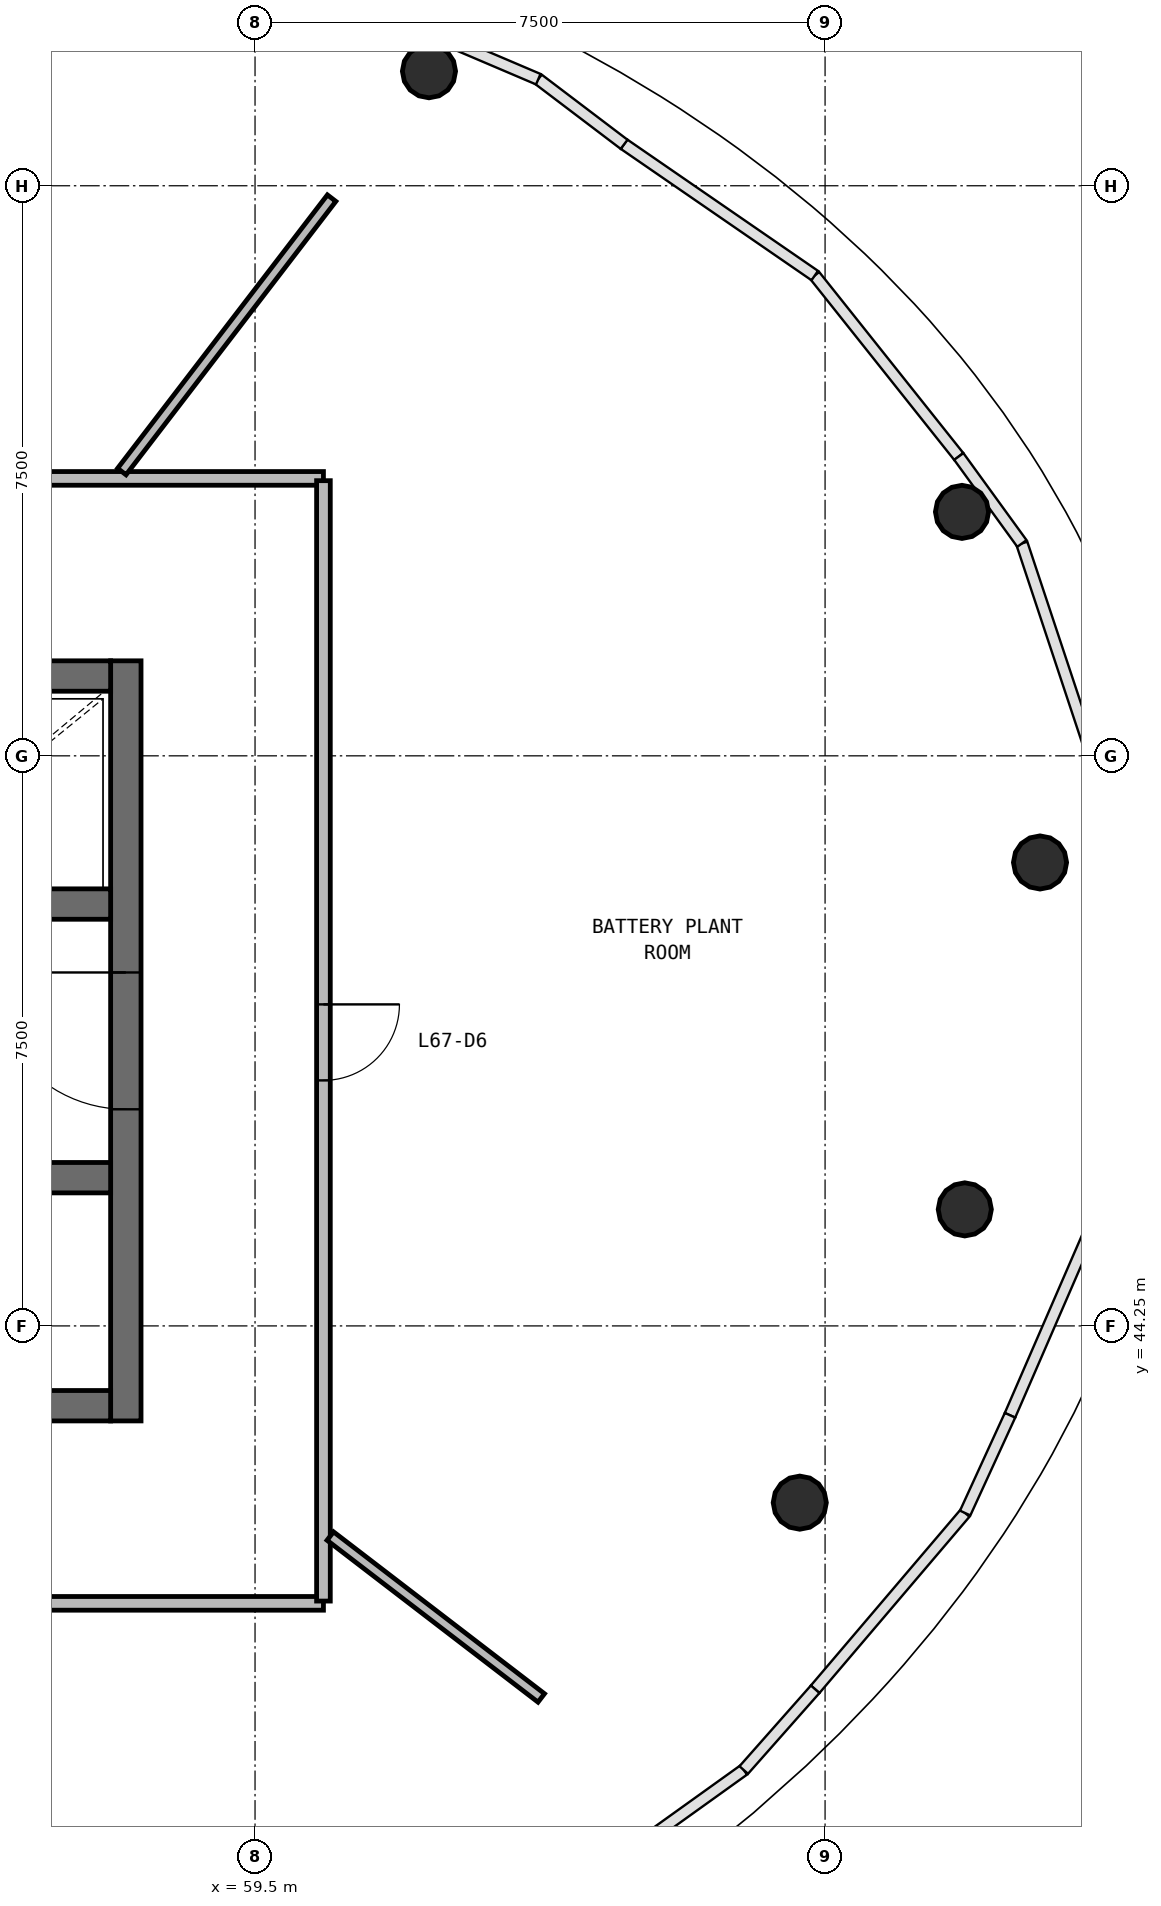
"""IFC4 building model, lengths in metres.
Left out: names, types, materials, properties, quantities, classifications, styles, units other than length and angle.
Written with IfcOpenShell. Run it as: python <this file> out.ifc"""

import sys

from ifc_helpers import new_model, si_unit, direction, frame, frame_2d, origin, origin_2d, place, context, subcontext, project, spatial, rectangle, circle, extrude, source, transform, mapped, element, fill, save


model = new_model("IFC4")
c1 = context("Model", 3, precision=1e-05, world=origin(), true_north=direction((0.0, 1.0)))
c2 = subcontext(c1, "Body", "Model", "MODEL_VIEW")
j1 = project(units=[si_unit("LENGTHUNIT", "METRE"), si_unit("PLANEANGLEUNIT", "RADIAN")], contexts=[c1])
p1 = place(None, origin())
s1 = spatial("IfcSite", under=j1, at=p1, CompositionType="ELEMENT")
p2 = place(p1, origin())
s2 = spatial("IfcBuilding", under=s1, at=p2, CompositionType="ELEMENT")
p3 = place(p2, frame((0.0, 0.0, 273.1)))
s3 = spatial("IfcBuildingStorey", under=s2, at=p3, CompositionType="ELEMENT", Elevation=273.1)
p4 = place(p3, frame((57.8, 43.0, 0.0), z_axis=(0.0, 0.0, 1.0), x_axis=(0.0, 1.0, 0.0)))
e1 = element("IfcWall", 1, at=p4, inside=s3, PredefinedType="SHEAR", context=c2, shape_type="SweptSolid", body=[
    extrude(rectangle(XDim=10.0, YDim=0.4, at=frame_2d((5.0, 0.0))), origin(), (0.0, 0.0, 1.0), 3.5),
])
p5 = place(p4, frame((4.1, 0.0, 0.0)))
e2 = element("IfcOpeningElement", 2, at=p5, cuts=e1, PredefinedType="OPENING", context=c2, shape_type="SweptSolid", body=[
    extrude(rectangle(XDim=1.8, YDim=2.1, at=frame_2d((0.9, 1.05))), frame((0.0, 0.21, 0.0), z_axis=(0.0, -1.0, 0.0), x_axis=(1.0, 0.0, 0.0)), (0.0, 0.0, 1.0), 0.42),
])
p6 = place(p3, frame((46.4, 43.2, 0.0), z_axis=(0.0, 0.0, 1.0), x_axis=(1.0, 0.0, 0.0)))
e3 = element("IfcWall", 3, at=p6, inside=s3, PredefinedType="SHEAR", context=c2, shape_type="SweptSolid", body=[
    extrude(rectangle(XDim=11.2, YDim=0.4, at=frame_2d((5.6, 0.0))), origin(), (0.0, 0.0, 1.0), 3.5),
])
p7 = place(p3, frame((57.6, 52.8, 0.0), z_axis=(0.0, 0.0, 1.0), x_axis=(-1.0, 0.0, 0.0)))
e4 = element("IfcWall", 4, at=p7, inside=s3, PredefinedType="SHEAR", context=c2, shape_type="SweptSolid", body=[
    extrude(rectangle(XDim=11.2, YDim=0.4, at=frame_2d((5.6, 0.0))), origin(), (0.0, 0.0, 1.0), 3.5),
])
p8 = place(p7, frame((6.1, 0.0, 0.0)))
e5 = element("IfcOpeningElement", 5, at=p8, cuts=e4, PredefinedType="OPENING", context=c2, shape_type="SweptSolid", body=[
    extrude(rectangle(XDim=1.0, YDim=2.1, at=frame_2d((0.5, 1.05))), frame((0.0, 0.21, 0.0), z_axis=(0.0, -1.0, 0.0), x_axis=(1.0, 0.0, 0.0)), (0.0, 0.0, 1.0), 0.42),
])
p9 = place(p3, frame((46.4, 49.8, 0.0), z_axis=(0.0, 0.0, 1.0), x_axis=(1.0, 0.0, 0.0)))
e6 = element("IfcWall", 6, at=p9, inside=s3, PredefinedType="SHEAR", context=c2, shape_type="SweptSolid", body=[
    extrude(rectangle(XDim=11.2, YDim=0.4, at=frame_2d((5.6, 0.0))), origin(), (0.0, 0.0, 1.0), 3.5),
])
p10 = place(p9, frame((8.95, 0.0, 0.0)))
e7 = element("IfcOpeningElement", 7, at=p10, cuts=e6, PredefinedType="OPENING", context=c2, shape_type="SweptSolid", body=[
    extrude(rectangle(XDim=1.1, YDim=2.1, at=frame_2d((0.55, 1.05))), frame((0.0, 0.21, 0.0), z_axis=(0.0, -1.0, 0.0), x_axis=(1.0, 0.0, 0.0)), (0.0, 0.0, 1.0), 0.42),
])
p11 = place(p9, frame((5.65, 0.0, 0.0)))
e8 = element("IfcOpeningElement", 8, at=p11, cuts=e6, PredefinedType="OPENING", context=c2, shape_type="SweptSolid", body=[
    extrude(rectangle(XDim=0.9, YDim=2.1, at=frame_2d((0.45, 1.05))), frame((0.0, 0.21, 0.0), z_axis=(0.0, -1.0, 0.0), x_axis=(1.0, 0.0, 0.0)), (0.0, 0.0, 1.0), 0.42),
])
p12 = place(p3, frame((46.4, 46.2, 0.0), z_axis=(0.0, 0.0, 1.0), x_axis=(1.0, 0.0, 0.0)))
e9 = element("IfcWall", 9, at=p12, inside=s3, PredefinedType="SHEAR", context=c2, shape_type="SweptSolid", body=[
    extrude(rectangle(XDim=11.2, YDim=0.4, at=frame_2d((5.6, 0.0))), origin(), (0.0, 0.0, 1.0), 3.5),
])
p13 = place(p12, frame((5.65, 0.0, 0.0)))
e10 = element("IfcOpeningElement", 10, at=p13, cuts=e9, PredefinedType="OPENING", context=c2, shape_type="SweptSolid", body=[
    extrude(rectangle(XDim=0.9, YDim=2.1, at=frame_2d((0.45, 1.05))), frame((0.0, 0.21, 0.0), z_axis=(0.0, -1.0, 0.0), x_axis=(1.0, 0.0, 0.0)), (0.0, 0.0, 1.0), 0.42),
])
m1 = source(origin(), c2, "Body", "SweptSolid", [
    extrude(circle(Radius=0.35, at=origin_2d()), origin(), (0.0, 0.0, 1.0), 4.014),
])
p14 = place(p3, frame((69.828, 50.347, 0.174), z_axis=(-0.485558404991, -0.063918071599, 0.871864390525), x_axis=(0.130512333023, -0.991446685873, 0.0)))
e11 = element("IfcColumn", 11, at=p14, inside=s3, PredefinedType="COLUMN", context=c2, shape_type="MappedRepresentation", body=[
    mapped(m1, transform((0.0, 0.0, 0.0), scale=1.0)),
])
m2 = source(origin(), c2, "Body", "SweptSolid", [
    extrude(circle(Radius=0.35, at=origin_2d()), origin(), (0.0, 0.0, 1.0), 4.07),
])
p15 = place(p3, frame((68.802, 54.959, 0.181), z_axis=(-0.471360109961, -0.195275188739, 0.860050723737), x_axis=(0.38273602667, -0.923857745483, 0.0)))
e12 = element("IfcColumn", 12, at=p15, inside=s3, PredefinedType="COLUMN", context=c2, shape_type="MappedRepresentation", body=[
    mapped(m2, transform((0.0, 0.0, 0.0), scale=1.0)),
])
m3 = source(origin(), c2, "Body", "SweptSolid", [
    extrude(circle(Radius=0.35, at=origin_2d()), origin(), (0.0, 0.0, 1.0), 3.908),
])
p16 = place(p3, frame((61.789, 60.757, 0.159), z_axis=(-0.270818872405, -0.352907914698, 0.895607694302), x_axis=(0.793328254579, -0.608794119951, 0.0)))
e13 = element("IfcColumn", 13, at=p16, inside=s3, PredefinedType="COLUMN", context=c2, shape_type="MappedRepresentation", body=[
    mapped(m3, transform((0.0, 0.0, 0.0), scale=1.0)),
])
m4 = source(origin(), c2, "Body", "SweptSolid", [
    extrude(circle(Radius=0.35, at=origin_2d()), origin(), (0.0, 0.0, 1.0), 3.834),
])
p17 = place(p3, frame((57.773, 61.938, 0.146), z_axis=(-0.156149965991, -0.377001549212, 0.912955102956), x_axis=(0.923887493655, -0.382664211899, 0.0)))
e14 = element("IfcColumn", 14, at=p17, inside=s3, PredefinedType="COLUMN", context=c2, shape_type="MappedRepresentation", body=[
    mapped(m4, transform((0.0, 0.0, 0.0), scale=1.0)),
])
m5 = source(origin(), c2, "Body", "SweptSolid", [
    extrude(circle(Radius=0.35, at=origin_2d()), origin(), (0.0, 0.0, 1.0), 3.739),
])
p18 = place(p3, frame((60.756, 36.59, 0.126), z_axis=(-0.213999096527, 0.278845328706, 0.936188906869), x_axis=(-0.79330723931, -0.608821504267, 0.0)))
e15 = element("IfcColumn", 15, at=p18, inside=s3, PredefinedType="COLUMN", context=c2, shape_type="MappedRepresentation", body=[
    mapped(m5, transform((0.0, 0.0, 0.0), scale=1.0)),
])
m6 = source(origin(), c2, "Body", "SweptSolid", [
    extrude(circle(Radius=0.35, at=origin_2d()), origin(), (0.0, 0.0, 1.0), 3.807),
])
p19 = place(p3, frame((66.667, 41.925, 0.141), z_axis=(-0.363645996148, 0.150626775693, 0.919278610613), x_axis=(-0.382682721486, -0.923879826967, 0.0)))
e16 = element("IfcColumn", 16, at=p19, inside=s3, PredefinedType="COLUMN", context=c2, shape_type="MappedRepresentation", body=[
    mapped(m6, transform((0.0, 0.0, 0.0), scale=1.0)),
])
m7 = source(origin(), c2, "Body", "SweptSolid", [
    extrude(circle(Radius=0.35, at=origin_2d()), origin(), (0.0, 0.0, 1.0), 3.898),
])
p20 = place(p3, frame((68.838, 45.783, 0.157), z_axis=(-0.436525820631, 0.057493644669, 0.897852821316), x_axis=(-0.130579616175, -0.991437826512, 0.0)))
e17 = element("IfcColumn", 17, at=p20, inside=s3, PredefinedType="COLUMN", context=c2, shape_type="MappedRepresentation", body=[
    mapped(m7, transform((0.0, 0.0, 0.0), scale=1.0)),
])
p21 = place(p3, frame((43.6, 55.4, 0.0), z_axis=(0.0, 0.0, 1.0), x_axis=(1.0, 0.0, 0.0)))
e18 = element("IfcWall", 18, at=p21, inside=s3, PredefinedType="PARTITIONING", context=c2, shape_type="SweptSolid", body=[
    extrude(rectangle(XDim=16.8, YDim=0.18, at=frame_2d((8.4, 0.0))), origin(), (0.0, 0.0, 1.0), 2.62),
])
p22 = place(p21, frame((7.95, 0.0, 0.0)))
e19 = element("IfcOpeningElement", 19, at=p22, cuts=e18, PredefinedType="OPENING", context=c2, shape_type="SweptSolid", body=[
    extrude(rectangle(XDim=1.0, YDim=2.1, at=frame_2d((0.5, 1.05))), frame((0.0, 0.1, 0.0), z_axis=(0.0, -1.0, 0.0), x_axis=(1.0, 0.0, 0.0)), (0.0, 0.0, 1.0), 0.2),
])
p23 = place(p3, frame((60.4, 40.6, 0.0), z_axis=(0.0, 0.0, 1.0), x_axis=(-1.0, 0.0, 0.0)))
e20 = element("IfcWall", 20, at=p23, inside=s3, PredefinedType="PARTITIONING", context=c2, shape_type="SweptSolid", body=[
    extrude(rectangle(XDim=16.8, YDim=0.18, at=frame_2d((8.4, 0.0))), origin(), (0.0, 0.0, 1.0), 2.62),
])
p24 = place(p23, frame((7.95, 0.0, 0.0)))
e21 = element("IfcOpeningElement", 21, at=p24, cuts=e20, PredefinedType="OPENING", context=c2, shape_type="SweptSolid", body=[
    extrude(rectangle(XDim=1.0, YDim=2.1, at=frame_2d((0.5, 1.05))), frame((0.0, 0.1, 0.0), z_axis=(0.0, -1.0, 0.0), x_axis=(1.0, 0.0, 0.0)), (0.0, 0.0, 1.0), 0.2),
])
p25 = place(p3, frame((60.4, 55.37, 0.0), z_axis=(0.0, 0.0, 1.0), x_axis=(0.0, -1.0, 0.0)))
e22 = element("IfcWall", 22, at=p25, inside=s3, PredefinedType="PARTITIONING", context=c2, shape_type="SweptSolid", body=[
    extrude(rectangle(XDim=14.74, YDim=0.18, at=frame_2d((7.37, 0.0))), origin(), (0.0, 0.0, 1.0), 2.613),
])
p26 = place(p25, frame((6.89, 0.0, 0.0)))
e23 = element("IfcOpeningElement", 23, at=p26, cuts=e22, PredefinedType="OPENING", context=c2, shape_type="SweptSolid", body=[
    extrude(rectangle(XDim=1.0, YDim=2.1, at=frame_2d((0.5, 1.05))), frame((0.0, 0.1, 0.0), z_axis=(0.0, -1.0, 0.0), x_axis=(1.0, 0.0, 0.0)), (0.0, 0.0, 1.0), 0.2),
])
p27 = place(p3, frame((60.49, 41.485, 0.0), z_axis=(0.0, 0.0, 1.0), x_axis=(0.793378297772, -0.608728902407, 0.0)))
e24 = element("IfcWall", 24, at=p27, inside=s3, PredefinedType="PARTITIONING", context=c2, shape_type="SweptSolid", body=[
    extrude(rectangle(XDim=3.499, YDim=0.14, at=frame_2d((1.749, 0.0))), origin(), (0.0, 0.0, 1.0), 2.62),
])
p28 = place(p3, frame((57.747, 55.49, 0.0), z_axis=(0.0, 0.0, 1.0), x_axis=(0.608742343677, 0.793367984617, 0.0)))
e25 = element("IfcWall", 25, at=p28, inside=s3, PredefinedType="PARTITIONING", context=c2, shape_type="SweptSolid", body=[
    extrude(rectangle(XDim=4.534, YDim=0.14, at=frame_2d((2.267, 0.0))), origin(), (0.0, 0.0, 1.0), 2.62),
])
m8 = source(origin(), c2, "Body", "SweptSolid", [
    extrude(rectangle(XDim=1.8, YDim=2.1, at=frame_2d((0.9, 1.05))), frame((0.0, 0.025, 0.0), z_axis=(0.0, -1.0, 0.0), x_axis=(1.0, 0.0, 0.0)), (0.0, 0.0, 1.0), 0.05),
])
p29 = place(p5, origin())
e26 = element("IfcDoor", 26, at=p29, inside=s3, OperationType="SINGLE_SWING_RIGHT", PredefinedType="DOOR", context=c2, shape_type="MappedRepresentation", body=[
    mapped(m8, transform((0.0, 0.0, 0.0), scale=1.0)),
])
fill(e2, e26)
m9 = source(origin(), c2, "Body", "SweptSolid", [
    extrude(rectangle(XDim=1.0, YDim=2.1, at=frame_2d((0.5, 1.05))), frame((0.0, 0.025, 0.0), z_axis=(0.0, -1.0, 0.0), x_axis=(1.0, 0.0, 0.0)), (0.0, 0.0, 1.0), 0.05),
])
p30 = place(p26, origin())
e27 = element("IfcDoor", 27, at=p30, inside=s3, OperationType="SINGLE_SWING_LEFT", PredefinedType="DOOR", context=c2, shape_type="MappedRepresentation", body=[
    mapped(m9, transform((0.0, 0.0, 0.0), scale=1.0)),
])
fill(e23, e27)
save(model, sys.argv[1])
